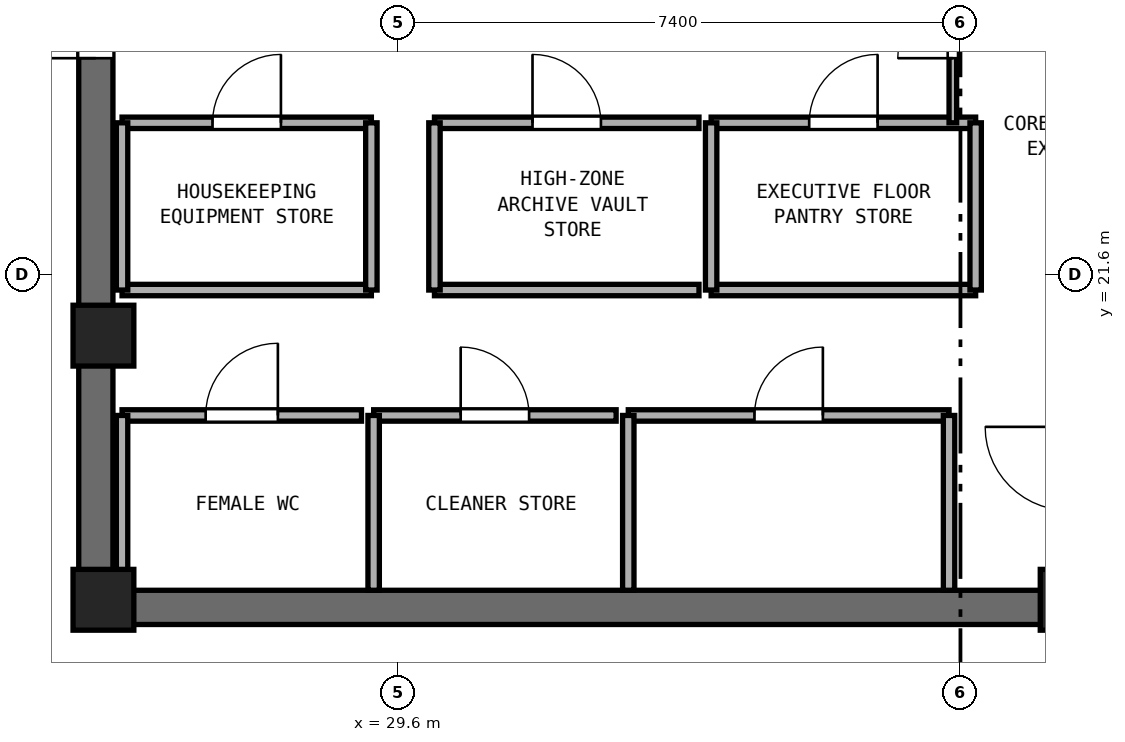
"""IFC4 building model, lengths in metres.
Left out: names, types, materials, properties, quantities, classifications, styles, units other than length and angle.
Written with IfcOpenShell. Run it as: python <this file> out.ifc"""

import sys

from ifc_helpers import new_model, si_unit, direction, frame, frame_2d, origin, origin_2d, place, context, subcontext, project, spatial, rectangle, extrude, element, fill, save


model = new_model("IFC4")
c1 = context("Model", 3, precision=1e-05, world=origin(), true_north=direction((0.0, 1.0)))
c2 = subcontext(c1, "Body", "Model", "MODEL_VIEW")
j1 = project(units=[si_unit("LENGTHUNIT", "METRE"), si_unit("PLANEANGLEUNIT", "RADIAN")], contexts=[c1])
p1 = place(None, origin())
s1 = spatial("IfcSite", under=j1, at=p1, CompositionType="ELEMENT")
p2 = place(p1, origin())
s2 = spatial("IfcBuilding", under=s1, at=p2, CompositionType="ELEMENT")
p3 = place(p2, frame((0.0, 0.0, 285.8)))
s3 = spatial("IfcBuildingStorey", under=s2, at=p3, CompositionType="ELEMENT", Elevation=285.8)
p4 = place(p3, frame((25.4, 17.225, 0.0), z_axis=(0.0, 0.0, 1.0), x_axis=(1.0, 0.0, 0.0)))
e1 = element("IfcWall", 1, at=p4, inside=s3, PredefinedType="SHEAR", context=c2, shape_type="SweptSolid", body=[
    extrude(rectangle(XDim=23.2, YDim=0.45, at=frame_2d((11.6, 0.0))), origin(), (0.0, 0.0, 1.0), 3.54),
])
p5 = place(p3, frame((25.625, 17.45, 0.0), z_axis=(0.0, 0.0, 1.0), x_axis=(0.0, 1.0, 0.0)))
e2 = element("IfcWall", 2, at=p5, inside=s3, PredefinedType="SHEAR", context=c2, shape_type="SweptSolid", body=[
    extrude(rectangle(XDim=15.5, YDim=0.45, at=frame_2d((7.75, 0.0))), origin(), (0.0, 0.0, 1.0), 3.54),
])
p6 = place(p5, frame((7.0, 0.0, 0.0)))
e3 = element("IfcOpeningElement", 3, at=p6, cuts=e2, PredefinedType="OPENING", context=c2, shape_type="SweptSolid", body=[
    extrude(rectangle(XDim=1.5, YDim=2.15, at=frame_2d((0.75, 1.075))), frame((0.0, 0.235, 0.0), z_axis=(0.0, -1.0, 0.0), x_axis=(1.0, 0.0, 0.0)), (0.0, 0.0, 1.0), 0.47),
])
for number, where, z_axis, x_axis in (
    (4, (25.725, 17.325, 0.0), (0.0, 0.0, 1.0), (1.0, 0.0, 0.0)),
    (5, (38.45, 17.325, 0.0), (0.0, 0.0, 1.0), (1.0, 0.0, 0.0)),
    (6, (25.725, 20.8, 0.0), (0.0, 0.0, 1.0), (1.0, 0.0, 0.0)),
):
    element("IfcColumn", number, at=place(p3, frame(where, z_axis=z_axis, x_axis=x_axis)), inside=s3, PredefinedType="PILASTER", context=c2, shape_type="SweptSolid", body=[
        extrude(rectangle(XDim=0.8, YDim=0.8, at=origin_2d()), origin(), (0.0, 0.0, 1.0), 3.8),
    ])
p7 = place(p3, frame((25.97, 19.75, 0.0), z_axis=(0.0, 0.0, 1.0), x_axis=(1.0, 0.0, 0.0)))
e7 = element("IfcWall", 7, at=p7, inside=s3, PredefinedType="PARTITIONING", context=c2, shape_type="SweptSolid", body=[
    extrude(rectangle(XDim=3.15, YDim=0.15, at=frame_2d((1.575, 0.0))), origin(), (0.0, 0.0, 1.0), 3.54),
])
p8 = place(p7, frame((1.1, 0.0, 0.0)))
e8 = element("IfcOpeningElement", 8, at=p8, cuts=e7, PredefinedType="OPENING", context=c2, shape_type="SweptSolid", body=[
    extrude(rectangle(XDim=0.95, YDim=2.1, at=frame_2d((0.475, 1.05))), frame((0.0, 0.085, 0.0), z_axis=(0.0, -1.0, 0.0), x_axis=(1.0, 0.0, 0.0)), (0.0, 0.0, 1.0), 0.17),
])
p9 = place(p3, frame((25.97, 17.45, 0.0), z_axis=(0.0, 0.0, 1.0), x_axis=(0.0, 1.0, 0.0)))
e9 = element("IfcWall", 9, at=p9, inside=s3, PredefinedType="PARTITIONING", context=c2, shape_type="SweptSolid", body=[
    extrude(rectangle(XDim=2.3, YDim=0.15, at=frame_2d((1.15, 0.0))), origin(), (0.0, 0.0, 1.0), 2.64),
])
p10 = place(p3, frame((29.28, 19.75, 0.0), z_axis=(0.0, 0.0, 1.0), x_axis=(1.0, 0.0, 0.0)))
e10 = element("IfcWall", 10, at=p10, inside=s3, PredefinedType="PARTITIONING", context=c2, shape_type="SweptSolid", body=[
    extrude(rectangle(XDim=3.19, YDim=0.15, at=frame_2d((1.595, 0.0))), origin(), (0.0, 0.0, 1.0), 3.54),
])
p11 = place(p10, frame((1.145, 0.0, 0.0)))
e11 = element("IfcOpeningElement", 11, at=p11, cuts=e10, PredefinedType="OPENING", context=c2, shape_type="SweptSolid", body=[
    extrude(rectangle(XDim=0.9, YDim=2.1, at=frame_2d((0.45, 1.05))), frame((0.0, 0.085, 0.0), z_axis=(0.0, -1.0, 0.0), x_axis=(1.0, 0.0, 0.0)), (0.0, 0.0, 1.0), 0.17),
])
p12 = place(p3, frame((29.28, 17.45, 0.0), z_axis=(0.0, 0.0, 1.0), x_axis=(0.0, 1.0, 0.0)))
e12 = element("IfcWall", 12, at=p12, inside=s3, PredefinedType="PARTITIONING", context=c2, shape_type="SweptSolid", body=[
    extrude(rectangle(XDim=2.3, YDim=0.15, at=frame_2d((1.15, 0.0))), origin(), (0.0, 0.0, 1.0), 3.54),
])
p13 = place(p3, frame((32.63, 19.75, 0.0), z_axis=(0.0, 0.0, 1.0), x_axis=(1.0, 0.0, 0.0)))
e13 = element("IfcWall", 13, at=p13, inside=s3, PredefinedType="PARTITIONING", context=c2, shape_type="SweptSolid", body=[
    extrude(rectangle(XDim=4.22, YDim=0.15, at=frame_2d((2.11, 0.0))), origin(), (0.0, 0.0, 1.0), 3.54),
])
p14 = place(p13, frame((1.66, 0.0, 0.0)))
e14 = element("IfcOpeningElement", 14, at=p14, cuts=e13, PredefinedType="OPENING", context=c2, shape_type="SweptSolid", body=[
    extrude(rectangle(XDim=0.9, YDim=2.1, at=frame_2d((0.45, 1.05))), frame((0.0, 0.085, 0.0), z_axis=(0.0, -1.0, 0.0), x_axis=(1.0, 0.0, 0.0)), (0.0, 0.0, 1.0), 0.17),
])
for number, where, z_axis, x_axis in (
    (15, (32.63, 17.45, 0.0), (0.0, 0.0, 1.0), (0.0, 1.0, 0.0)),
    (16, (36.85, 17.45, 0.0), (0.0, 0.0, 1.0), (0.0, 1.0, 0.0)),
):
    element("IfcWall", number, at=place(p3, frame(where, z_axis=z_axis, x_axis=x_axis)), inside=s3, PredefinedType="PARTITIONING", context=c2, shape_type="SweptSolid", body=[
        extrude(rectangle(XDim=2.3, YDim=0.15, at=frame_2d((1.15, 0.0))), origin(), (0.0, 0.0, 1.0), 3.54),
    ])
p15 = place(p3, frame((25.97, 21.4, 0.0), z_axis=(0.0, 0.0, 1.0), x_axis=(1.0, 0.0, 0.0)))
e17 = element("IfcWall", 17, at=p15, inside=s3, PredefinedType="PARTITIONING", context=c2, shape_type="SweptSolid", body=[
    extrude(rectangle(XDim=3.28, YDim=0.15, at=frame_2d((1.64, 0.0))), origin(), (0.0, 0.0, 1.0), 3.54),
])
p16 = place(p3, frame((25.97, 23.6, 0.0), z_axis=(0.0, 0.0, 1.0), x_axis=(1.0, 0.0, 0.0)))
e18 = element("IfcWall", 18, at=p16, inside=s3, PredefinedType="PARTITIONING", context=c2, shape_type="SweptSolid", body=[
    extrude(rectangle(XDim=3.28, YDim=0.15, at=frame_2d((1.64, 0.0))), origin(), (0.0, 0.0, 1.0), 3.54),
])
p17 = place(p16, frame((1.19, 0.0, 0.0)))
e19 = element("IfcOpeningElement", 19, at=p17, cuts=e18, PredefinedType="OPENING", context=c2, shape_type="SweptSolid", body=[
    extrude(rectangle(XDim=0.9, YDim=2.1, at=frame_2d((0.45, 1.05))), frame((0.0, 0.085, 0.0), z_axis=(0.0, -1.0, 0.0), x_axis=(1.0, 0.0, 0.0)), (0.0, 0.0, 1.0), 0.17),
])
p18 = place(p3, frame((25.97, 21.4, 0.0), z_axis=(0.0, 0.0, 1.0), x_axis=(0.0, 1.0, 0.0)))
e20 = element("IfcWall", 20, at=p18, inside=s3, PredefinedType="PARTITIONING", context=c2, shape_type="SweptSolid", body=[
    extrude(rectangle(XDim=2.2, YDim=0.15, at=frame_2d((1.1, 0.0))), origin(), (0.0, 0.0, 1.0), 2.64),
])
p19 = place(p3, frame((29.25, 21.4, 0.0), z_axis=(0.0, 0.0, 1.0), x_axis=(0.0, 1.0, 0.0)))
e21 = element("IfcWall", 21, at=p19, inside=s3, PredefinedType="PARTITIONING", context=c2, shape_type="SweptSolid", body=[
    extrude(rectangle(XDim=2.2, YDim=0.15, at=frame_2d((1.1, 0.0))), origin(), (0.0, 0.0, 1.0), 3.54),
])
p20 = place(p3, frame((30.08, 21.4, 0.0), z_axis=(0.0, 0.0, 1.0), x_axis=(1.0, 0.0, 0.0)))
e22 = element("IfcWall", 22, at=p20, inside=s3, PredefinedType="PARTITIONING", context=c2, shape_type="SweptSolid", body=[
    extrude(rectangle(XDim=3.48, YDim=0.15, at=frame_2d((1.74, 0.0))), origin(), (0.0, 0.0, 1.0), 3.54),
])
p21 = place(p3, frame((30.08, 23.6, 0.0), z_axis=(0.0, 0.0, 1.0), x_axis=(1.0, 0.0, 0.0)))
e23 = element("IfcWall", 23, at=p21, inside=s3, PredefinedType="PARTITIONING", context=c2, shape_type="SweptSolid", body=[
    extrude(rectangle(XDim=3.48, YDim=0.15, at=frame_2d((1.74, 0.0))), origin(), (0.0, 0.0, 1.0), 3.54),
])
p22 = place(p21, frame((1.29, 0.0, 0.0)))
e24 = element("IfcOpeningElement", 24, at=p22, cuts=e23, PredefinedType="OPENING", context=c2, shape_type="SweptSolid", body=[
    extrude(rectangle(XDim=0.9, YDim=2.1, at=frame_2d((0.45, 1.05))), frame((0.0, 0.085, 0.0), z_axis=(0.0, -1.0, 0.0), x_axis=(1.0, 0.0, 0.0)), (0.0, 0.0, 1.0), 0.17),
])
p23 = place(p3, frame((30.08, 21.4, 0.0), z_axis=(0.0, 0.0, 1.0), x_axis=(0.0, 1.0, 0.0)))
e25 = element("IfcWall", 25, at=p23, inside=s3, PredefinedType="PARTITIONING", context=c2, shape_type="SweptSolid", body=[
    extrude(rectangle(XDim=2.2, YDim=0.15, at=frame_2d((1.1, 0.0))), origin(), (0.0, 0.0, 1.0), 3.54),
])
p24 = place(p3, frame((33.72, 21.4, 0.0), z_axis=(0.0, 0.0, 1.0), x_axis=(1.0, 0.0, 0.0)))
e26 = element("IfcWall", 26, at=p24, inside=s3, PredefinedType="PARTITIONING", context=c2, shape_type="SweptSolid", body=[
    extrude(rectangle(XDim=3.48, YDim=0.15, at=frame_2d((1.74, 0.0))), origin(), (0.0, 0.0, 1.0), 3.54),
])
p25 = place(p3, frame((33.72, 23.6, 0.0), z_axis=(0.0, 0.0, 1.0), x_axis=(1.0, 0.0, 0.0)))
e27 = element("IfcWall", 27, at=p25, inside=s3, PredefinedType="PARTITIONING", context=c2, shape_type="SweptSolid", body=[
    extrude(rectangle(XDim=3.48, YDim=0.15, at=frame_2d((1.74, 0.0))), origin(), (0.0, 0.0, 1.0), 3.54),
])
p26 = place(p25, frame((1.29, 0.0, 0.0)))
e28 = element("IfcOpeningElement", 28, at=p26, cuts=e27, PredefinedType="OPENING", context=c2, shape_type="SweptSolid", body=[
    extrude(rectangle(XDim=0.9, YDim=2.1, at=frame_2d((0.45, 1.05))), frame((0.0, 0.085, 0.0), z_axis=(0.0, -1.0, 0.0), x_axis=(1.0, 0.0, 0.0)), (0.0, 0.0, 1.0), 0.17),
])
for number, where, z_axis, x_axis in (
    (29, (33.72, 21.4, 0.0), (0.0, 0.0, 1.0), (0.0, 1.0, 0.0)),
    (30, (37.2, 21.4, 0.0), (0.0, 0.0, 1.0), (0.0, 1.0, 0.0)),
):
    element("IfcWall", number, at=place(p3, frame(where, z_axis=z_axis, x_axis=x_axis)), inside=s3, PredefinedType="PARTITIONING", context=c2, shape_type="SweptSolid", body=[
        extrude(rectangle(XDim=2.2, YDim=0.15, at=frame_2d((1.1, 0.0))), origin(), (0.0, 0.0, 1.0), 3.54),
    ])
p27 = place(p3, frame((36.9, 23.6, 0.0), z_axis=(0.0, 0.0, 1.0), x_axis=(0.0, 1.0, 0.0)))
e31 = element("IfcWall", 31, at=p27, inside=s3, PredefinedType="PARTITIONING", context=c2, shape_type="SweptSolid", body=[
    extrude(rectangle(XDim=3.2, YDim=0.1, at=frame_2d((1.6, 0.0))), origin(), (0.0, 0.0, 1.0), 3.54),
])
p28 = place(p27, frame((0.85, 0.0, 0.0)))
e32 = element("IfcOpeningElement", 32, at=p28, cuts=e31, PredefinedType="OPENING", context=c2, shape_type="SweptSolid", body=[
    extrude(rectangle(XDim=1.45, YDim=2.12, at=frame_2d((0.725, 1.06))), frame((0.0, 0.06, 0.0), z_axis=(0.0, -1.0, 0.0), x_axis=(1.0, 0.0, 0.0)), (0.0, 0.0, 1.0), 0.12),
])
p29 = place(p6, origin())
e33 = element("IfcDoor", 33, at=p29, inside=s3, OperationType="DOUBLE_DOOR_SINGLE_SWING", PredefinedType="DOOR", context=c2, shape_type="SweptSolid", body=[
    extrude(rectangle(XDim=1.5, YDim=2.15, at=frame_2d((0.75, 1.075))), frame((0.0, 0.025, 0.0), z_axis=(0.0, -1.0, 0.0), x_axis=(1.0, 0.0, 0.0)), (0.0, 0.0, 1.0), 0.05),
])
fill(e3, e33)
p30 = place(p8, origin())
e34 = element("IfcDoor", 34, at=p30, inside=s3, OperationType="SINGLE_SWING_RIGHT", PredefinedType="DOOR", context=c2, shape_type="SweptSolid", body=[
    extrude(rectangle(XDim=0.95, YDim=2.1, at=frame_2d((0.475, 1.05))), frame((0.0, 0.025, 0.0), z_axis=(0.0, -1.0, 0.0), x_axis=(1.0, 0.0, 0.0)), (0.0, 0.0, 1.0), 0.05),
])
fill(e8, e34)
p31 = place(p11, origin())
e35 = element("IfcDoor", 35, at=p31, inside=s3, OperationType="SINGLE_SWING_LEFT", PredefinedType="DOOR", context=c2, shape_type="SweptSolid", body=[
    extrude(rectangle(XDim=0.9, YDim=2.1, at=frame_2d((0.45, 1.05))), frame((0.0, 0.025, 0.0), z_axis=(0.0, -1.0, 0.0), x_axis=(1.0, 0.0, 0.0)), (0.0, 0.0, 1.0), 0.05),
])
fill(e11, e35)
p32 = place(p14, origin())
e36 = element("IfcDoor", 36, at=p32, inside=s3, OperationType="SINGLE_SWING_RIGHT", PredefinedType="DOOR", context=c2, shape_type="SweptSolid", body=[
    extrude(rectangle(XDim=0.9, YDim=2.1, at=frame_2d((0.45, 1.05))), frame((0.0, 0.025, 0.0), z_axis=(0.0, -1.0, 0.0), x_axis=(1.0, 0.0, 0.0)), (0.0, 0.0, 1.0), 0.05),
])
fill(e14, e36)
p33 = place(p17, origin())
e37 = element("IfcDoor", 37, at=p33, inside=s3, OperationType="SINGLE_SWING_RIGHT", PredefinedType="DOOR", context=c2, shape_type="SweptSolid", body=[
    extrude(rectangle(XDim=0.9, YDim=2.1, at=frame_2d((0.45, 1.05))), frame((0.0, 0.025, 0.0), z_axis=(0.0, -1.0, 0.0), x_axis=(1.0, 0.0, 0.0)), (0.0, 0.0, 1.0), 0.05),
])
fill(e19, e37)
p34 = place(p22, origin())
e38 = element("IfcDoor", 38, at=p34, inside=s3, OperationType="SINGLE_SWING_LEFT", PredefinedType="DOOR", context=c2, shape_type="SweptSolid", body=[
    extrude(rectangle(XDim=0.9, YDim=2.1, at=frame_2d((0.45, 1.05))), frame((0.0, 0.025, 0.0), z_axis=(0.0, -1.0, 0.0), x_axis=(1.0, 0.0, 0.0)), (0.0, 0.0, 1.0), 0.05),
])
fill(e24, e38)
p35 = place(p26, origin())
e39 = element("IfcDoor", 39, at=p35, inside=s3, OperationType="SINGLE_SWING_RIGHT", PredefinedType="DOOR", context=c2, shape_type="SweptSolid", body=[
    extrude(rectangle(XDim=0.9, YDim=2.1, at=frame_2d((0.45, 1.05))), frame((0.0, 0.025, 0.0), z_axis=(0.0, -1.0, 0.0), x_axis=(1.0, 0.0, 0.0)), (0.0, 0.0, 1.0), 0.05),
])
fill(e28, e39)
p36 = place(p28, origin())
e40 = element("IfcDoor", 40, at=p36, inside=s3, OperationType="DOUBLE_DOOR_SINGLE_SWING", PredefinedType="DOOR", context=c2, shape_type="SweptSolid", body=[
    extrude(rectangle(XDim=1.45, YDim=2.12, at=frame_2d((0.725, 1.06))), frame((0.0, 0.025, 0.0), z_axis=(0.0, -1.0, 0.0), x_axis=(1.0, 0.0, 0.0)), (0.0, 0.0, 1.0), 0.05),
])
fill(e32, e40)
save(model, sys.argv[1])
